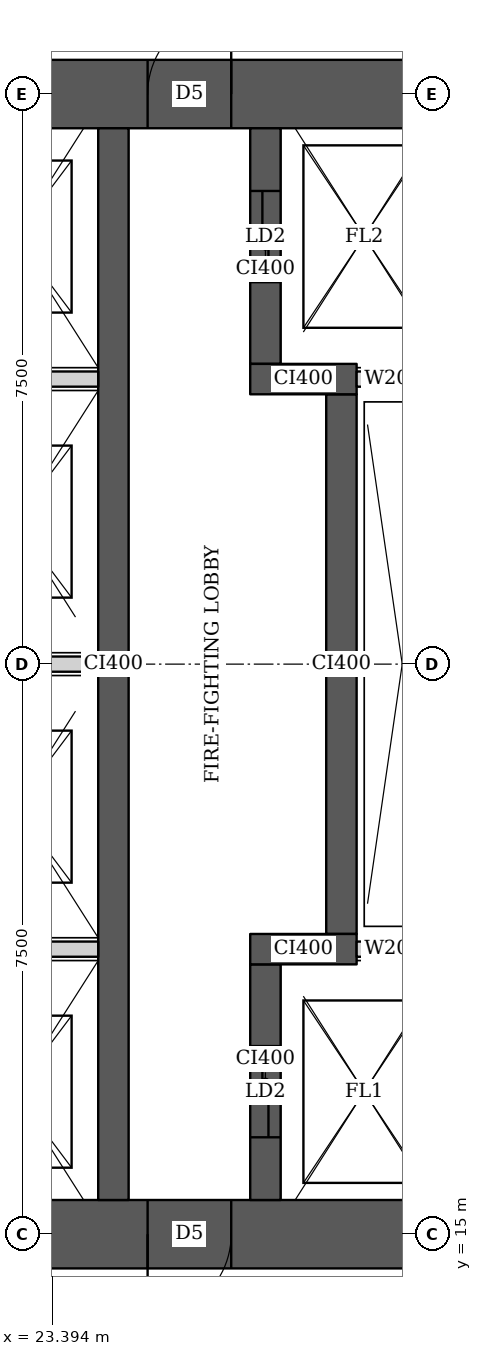
"""IFC4 building model, lengths in metres.
Left out: names, types, materials, properties, quantities, classifications, styles, units other than length and angle.
Written with IfcOpenShell. Run it as: python <this file> out.ifc"""

import sys

from ifc_helpers import new_model, si_unit, direction, frame, frame_2d, origin, place, context, subcontext, project, spatial, rectangle, extrude, element, fill, save


model = new_model("IFC4")
c1 = context("Model", 3, precision=1e-05, world=origin(), true_north=direction((0.0, 1.0)))
c2 = subcontext(c1, "Body", "Model", "MODEL_VIEW")
j1 = project(units=[si_unit("LENGTHUNIT", "METRE"), si_unit("PLANEANGLEUNIT", "RADIAN")], contexts=[c1])
p1 = place(None, origin())
s1 = spatial("IfcSite", under=j1, at=p1, CompositionType="ELEMENT")
p2 = place(p1, origin())
s2 = spatial("IfcBuilding", under=s1, at=p2, CompositionType="ELEMENT")
p3 = place(p2, frame((0.0, 0.0, 289.1)))
s3 = spatial("IfcBuildingStorey", under=s2, at=p3, CompositionType="ELEMENT", Elevation=289.1)
p4 = place(p3, frame((13.95, 15.0, 0.0), z_axis=(0.0, 0.0, 1.0), x_axis=(1.0, 0.0, 0.0)))
e1 = element("IfcWall", 1, at=p4, inside=s3, PredefinedType="SHEAR", context=c2, shape_type="SweptSolid", body=[
    extrude(rectangle(XDim=15.3, YDim=0.9, at=frame_2d((7.65, 0.0))), origin(), (0.0, 0.0, 1.0), 3.75),
])
p5 = place(p4, frame((4.45, 0.0, 0.0)))
e2 = element("IfcOpeningElement", 2, at=p5, cuts=e1, PredefinedType="OPENING", context=c2, shape_type="SweptSolid", body=[
    extrude(rectangle(XDim=1.8, YDim=2.1, at=frame_2d((0.9, 1.05))), frame((0.0, 0.46, 0.0), z_axis=(0.0, -1.0, 0.0), x_axis=(1.0, 0.0, 0.0)), (0.0, 0.0, 1.0), 0.92),
])
p6 = place(p4, frame((10.7, 0.0, 0.0)))
e3 = element("IfcOpeningElement", 3, at=p6, cuts=e1, PredefinedType="OPENING", context=c2, shape_type="SweptSolid", body=[
    extrude(rectangle(XDim=1.1, YDim=2.1, at=frame_2d((0.55, 1.05))), frame((0.0, 0.46, 0.0), z_axis=(0.0, -1.0, 0.0), x_axis=(1.0, 0.0, 0.0)), (0.0, 0.0, 1.0), 0.92),
])
p7 = place(p3, frame((13.95, 30.0, 0.0), z_axis=(0.0, 0.0, 1.0), x_axis=(1.0, 0.0, 0.0)))
e4 = element("IfcWall", 4, at=p7, inside=s3, PredefinedType="SHEAR", context=c2, shape_type="SweptSolid", body=[
    extrude(rectangle(XDim=15.3, YDim=0.9, at=frame_2d((7.65, 0.0))), origin(), (0.0, 0.0, 1.0), 3.75),
])
p8 = place(p7, frame((4.45, 0.0, 0.0)))
e5 = element("IfcOpeningElement", 5, at=p8, cuts=e4, PredefinedType="OPENING", context=c2, shape_type="SweptSolid", body=[
    extrude(rectangle(XDim=1.8, YDim=2.1, at=frame_2d((0.9, 1.05))), frame((0.0, 0.46, 0.0), z_axis=(0.0, -1.0, 0.0), x_axis=(1.0, 0.0, 0.0)), (0.0, 0.0, 1.0), 0.92),
])
p9 = place(p7, frame((10.7, 0.0, 0.0)))
e6 = element("IfcOpeningElement", 6, at=p9, cuts=e4, PredefinedType="OPENING", context=c2, shape_type="SweptSolid", body=[
    extrude(rectangle(XDim=1.1, YDim=2.1, at=frame_2d((0.55, 1.05))), frame((0.0, 0.46, 0.0), z_axis=(0.0, -1.0, 0.0), x_axis=(1.0, 0.0, 0.0)), (0.0, 0.0, 1.0), 0.92),
])
p10 = place(p3, frame((24.2, 15.45, 0.0), z_axis=(0.0, 0.0, 1.0), x_axis=(0.0, 1.0, 0.0)))
e7 = element("IfcWall", 7, at=p10, inside=s3, PredefinedType="SHEAR", context=c2, shape_type="SweptSolid", body=[
    extrude(rectangle(XDim=14.1, YDim=0.4, at=frame_2d((7.05, 0.0))), origin(), (0.0, 0.0, 1.0), 3.75),
])
p11 = place(p3, frame((26.2, 15.45, 0.0), z_axis=(0.0, 0.0, 1.0), x_axis=(0.0, 1.0, 0.0)))
e8 = element("IfcWall", 8, at=p11, inside=s3, PredefinedType="SHEAR", context=c2, shape_type="SweptSolid", body=[
    extrude(rectangle(XDim=3.1, YDim=0.4, at=frame_2d((1.55, 0.0))), origin(), (0.0, 0.0, 1.0), 3.75),
])
p12 = place(p11, frame((0.825, 0.0, 0.0)))
e9 = element("IfcOpeningElement", 9, at=p12, cuts=e8, PredefinedType="OPENING", context=c2, shape_type="SweptSolid", body=[
    extrude(rectangle(XDim=1.2, YDim=2.1, at=frame_2d((0.6, 1.05))), frame((0.0, 0.21, 0.0), z_axis=(0.0, -1.0, 0.0), x_axis=(1.0, 0.0, 0.0)), (0.0, 0.0, 1.0), 0.42),
])
p13 = place(p3, frame((26.0, 18.75, 0.0), z_axis=(0.0, 0.0, 1.0), x_axis=(1.0, 0.0, 0.0)))
e10 = element("IfcWall", 10, at=p13, inside=s3, PredefinedType="SHEAR", context=c2, shape_type="SweptSolid", body=[
    extrude(rectangle(XDim=1.4, YDim=0.4, at=frame_2d((0.7, 0.0))), origin(), (0.0, 0.0, 1.0), 3.75),
])
p14 = place(p3, frame((27.2, 18.95, 0.0), z_axis=(0.0, 0.0, 1.0), x_axis=(0.0, 1.0, 0.0)))
e11 = element("IfcWall", 11, at=p14, inside=s3, PredefinedType="SHEAR", context=c2, shape_type="SweptSolid", body=[
    extrude(rectangle(XDim=7.1, YDim=0.4, at=frame_2d((3.55, 0.0))), origin(), (0.0, 0.0, 1.0), 3.75),
])
p15 = place(p3, frame((26.0, 26.25, 0.0), z_axis=(0.0, 0.0, 1.0), x_axis=(1.0, 0.0, 0.0)))
e12 = element("IfcWall", 12, at=p15, inside=s3, PredefinedType="SHEAR", context=c2, shape_type="SweptSolid", body=[
    extrude(rectangle(XDim=1.4, YDim=0.4, at=frame_2d((0.7, 0.0))), origin(), (0.0, 0.0, 1.0), 3.75),
])
p16 = place(p3, frame((26.2, 26.45, 0.0), z_axis=(0.0, 0.0, 1.0), x_axis=(0.0, 1.0, 0.0)))
e13 = element("IfcWall", 13, at=p16, inside=s3, PredefinedType="SHEAR", context=c2, shape_type="SweptSolid", body=[
    extrude(rectangle(XDim=3.1, YDim=0.4, at=frame_2d((1.55, 0.0))), origin(), (0.0, 0.0, 1.0), 3.75),
])
p17 = place(p16, frame((1.075, 0.0, 0.0)))
e14 = element("IfcOpeningElement", 14, at=p17, cuts=e13, PredefinedType="OPENING", context=c2, shape_type="SweptSolid", body=[
    extrude(rectangle(XDim=1.2, YDim=2.1, at=frame_2d((0.6, 1.05))), frame((0.0, 0.21, 0.0), z_axis=(0.0, -1.0, 0.0), x_axis=(1.0, 0.0, 0.0)), (0.0, 0.0, 1.0), 0.42),
])
for number, where, z_axis, x_axis in (
    (15, (21.8, 18.75, 0.0), (0.0, 0.0, 1.0), (1.0, 0.0, 0.0)),
    (16, (21.8, 22.5, 0.0), (0.0, 0.0, 1.0), (1.0, 0.0, 0.0)),
    (17, (21.8, 26.25, 0.0), (0.0, 0.0, 1.0), (1.0, 0.0, 0.0)),
):
    element("IfcWall", number, at=place(p3, frame(where, z_axis=z_axis, x_axis=x_axis)), inside=s3, PredefinedType="SOLIDWALL", context=c2, shape_type="SweptSolid", body=[
        extrude(rectangle(XDim=2.2, YDim=0.2, at=frame_2d((1.1, 0.0))), origin(), (0.0, 0.0, 1.0), 3.5),
    ])
for number, where, z_axis, x_axis in (
    (18, (27.4, 18.75, 0.0), (0.0, 0.0, 1.0), (1.0, 0.0, 0.0)),
    (19, (27.4, 26.25, 0.0), (0.0, 0.0, 1.0), (1.0, 0.0, 0.0)),
):
    element("IfcWall", number, at=place(p3, frame(where, z_axis=z_axis, x_axis=x_axis)), inside=s3, PredefinedType="SOLIDWALL", context=c2, shape_type="SweptSolid", body=[
        extrude(rectangle(XDim=0.95, YDim=0.2, at=frame_2d((0.475, 0.0))), origin(), (0.0, 0.0, 1.0), 3.5),
    ])
p18 = place(p6, origin())
e20 = element("IfcDoor", 20, at=p18, inside=s3, OperationType="SINGLE_SWING_RIGHT", PredefinedType="DOOR", context=c2, shape_type="SweptSolid", body=[
    extrude(rectangle(XDim=1.1, YDim=2.1, at=frame_2d((0.55, 1.05))), frame((0.0, 0.025, 0.0), z_axis=(0.0, -1.0, 0.0), x_axis=(1.0, 0.0, 0.0)), (0.0, 0.0, 1.0), 0.05),
])
fill(e3, e20)
p19 = place(p9, origin())
e21 = element("IfcDoor", 21, at=p19, inside=s3, OperationType="SINGLE_SWING_RIGHT", PredefinedType="DOOR", context=c2, shape_type="SweptSolid", body=[
    extrude(rectangle(XDim=1.1, YDim=2.1, at=frame_2d((0.55, 1.05))), frame((0.0, 0.025, 0.0), z_axis=(0.0, -1.0, 0.0), x_axis=(1.0, 0.0, 0.0)), (0.0, 0.0, 1.0), 0.05),
])
fill(e6, e21)
p20 = place(p12, origin())
e22 = element("IfcDoor", 22, at=p20, inside=s3, OperationType="DOUBLE_DOOR_SLIDING", PredefinedType="DOOR", context=c2, shape_type="SweptSolid", body=[
    extrude(rectangle(XDim=1.2, YDim=2.1, at=frame_2d((0.6, 1.05))), frame((0.0, 0.025, 0.0), z_axis=(0.0, -1.0, 0.0), x_axis=(1.0, 0.0, 0.0)), (0.0, 0.0, 1.0), 0.05),
])
fill(e9, e22)
p21 = place(p17, origin())
e23 = element("IfcDoor", 23, at=p21, inside=s3, OperationType="DOUBLE_DOOR_SLIDING", PredefinedType="DOOR", context=c2, shape_type="SweptSolid", body=[
    extrude(rectangle(XDim=1.2, YDim=2.1, at=frame_2d((0.6, 1.05))), frame((0.0, 0.025, 0.0), z_axis=(0.0, -1.0, 0.0), x_axis=(1.0, 0.0, 0.0)), (0.0, 0.0, 1.0), 0.05),
])
fill(e14, e23)
save(model, sys.argv[1])
